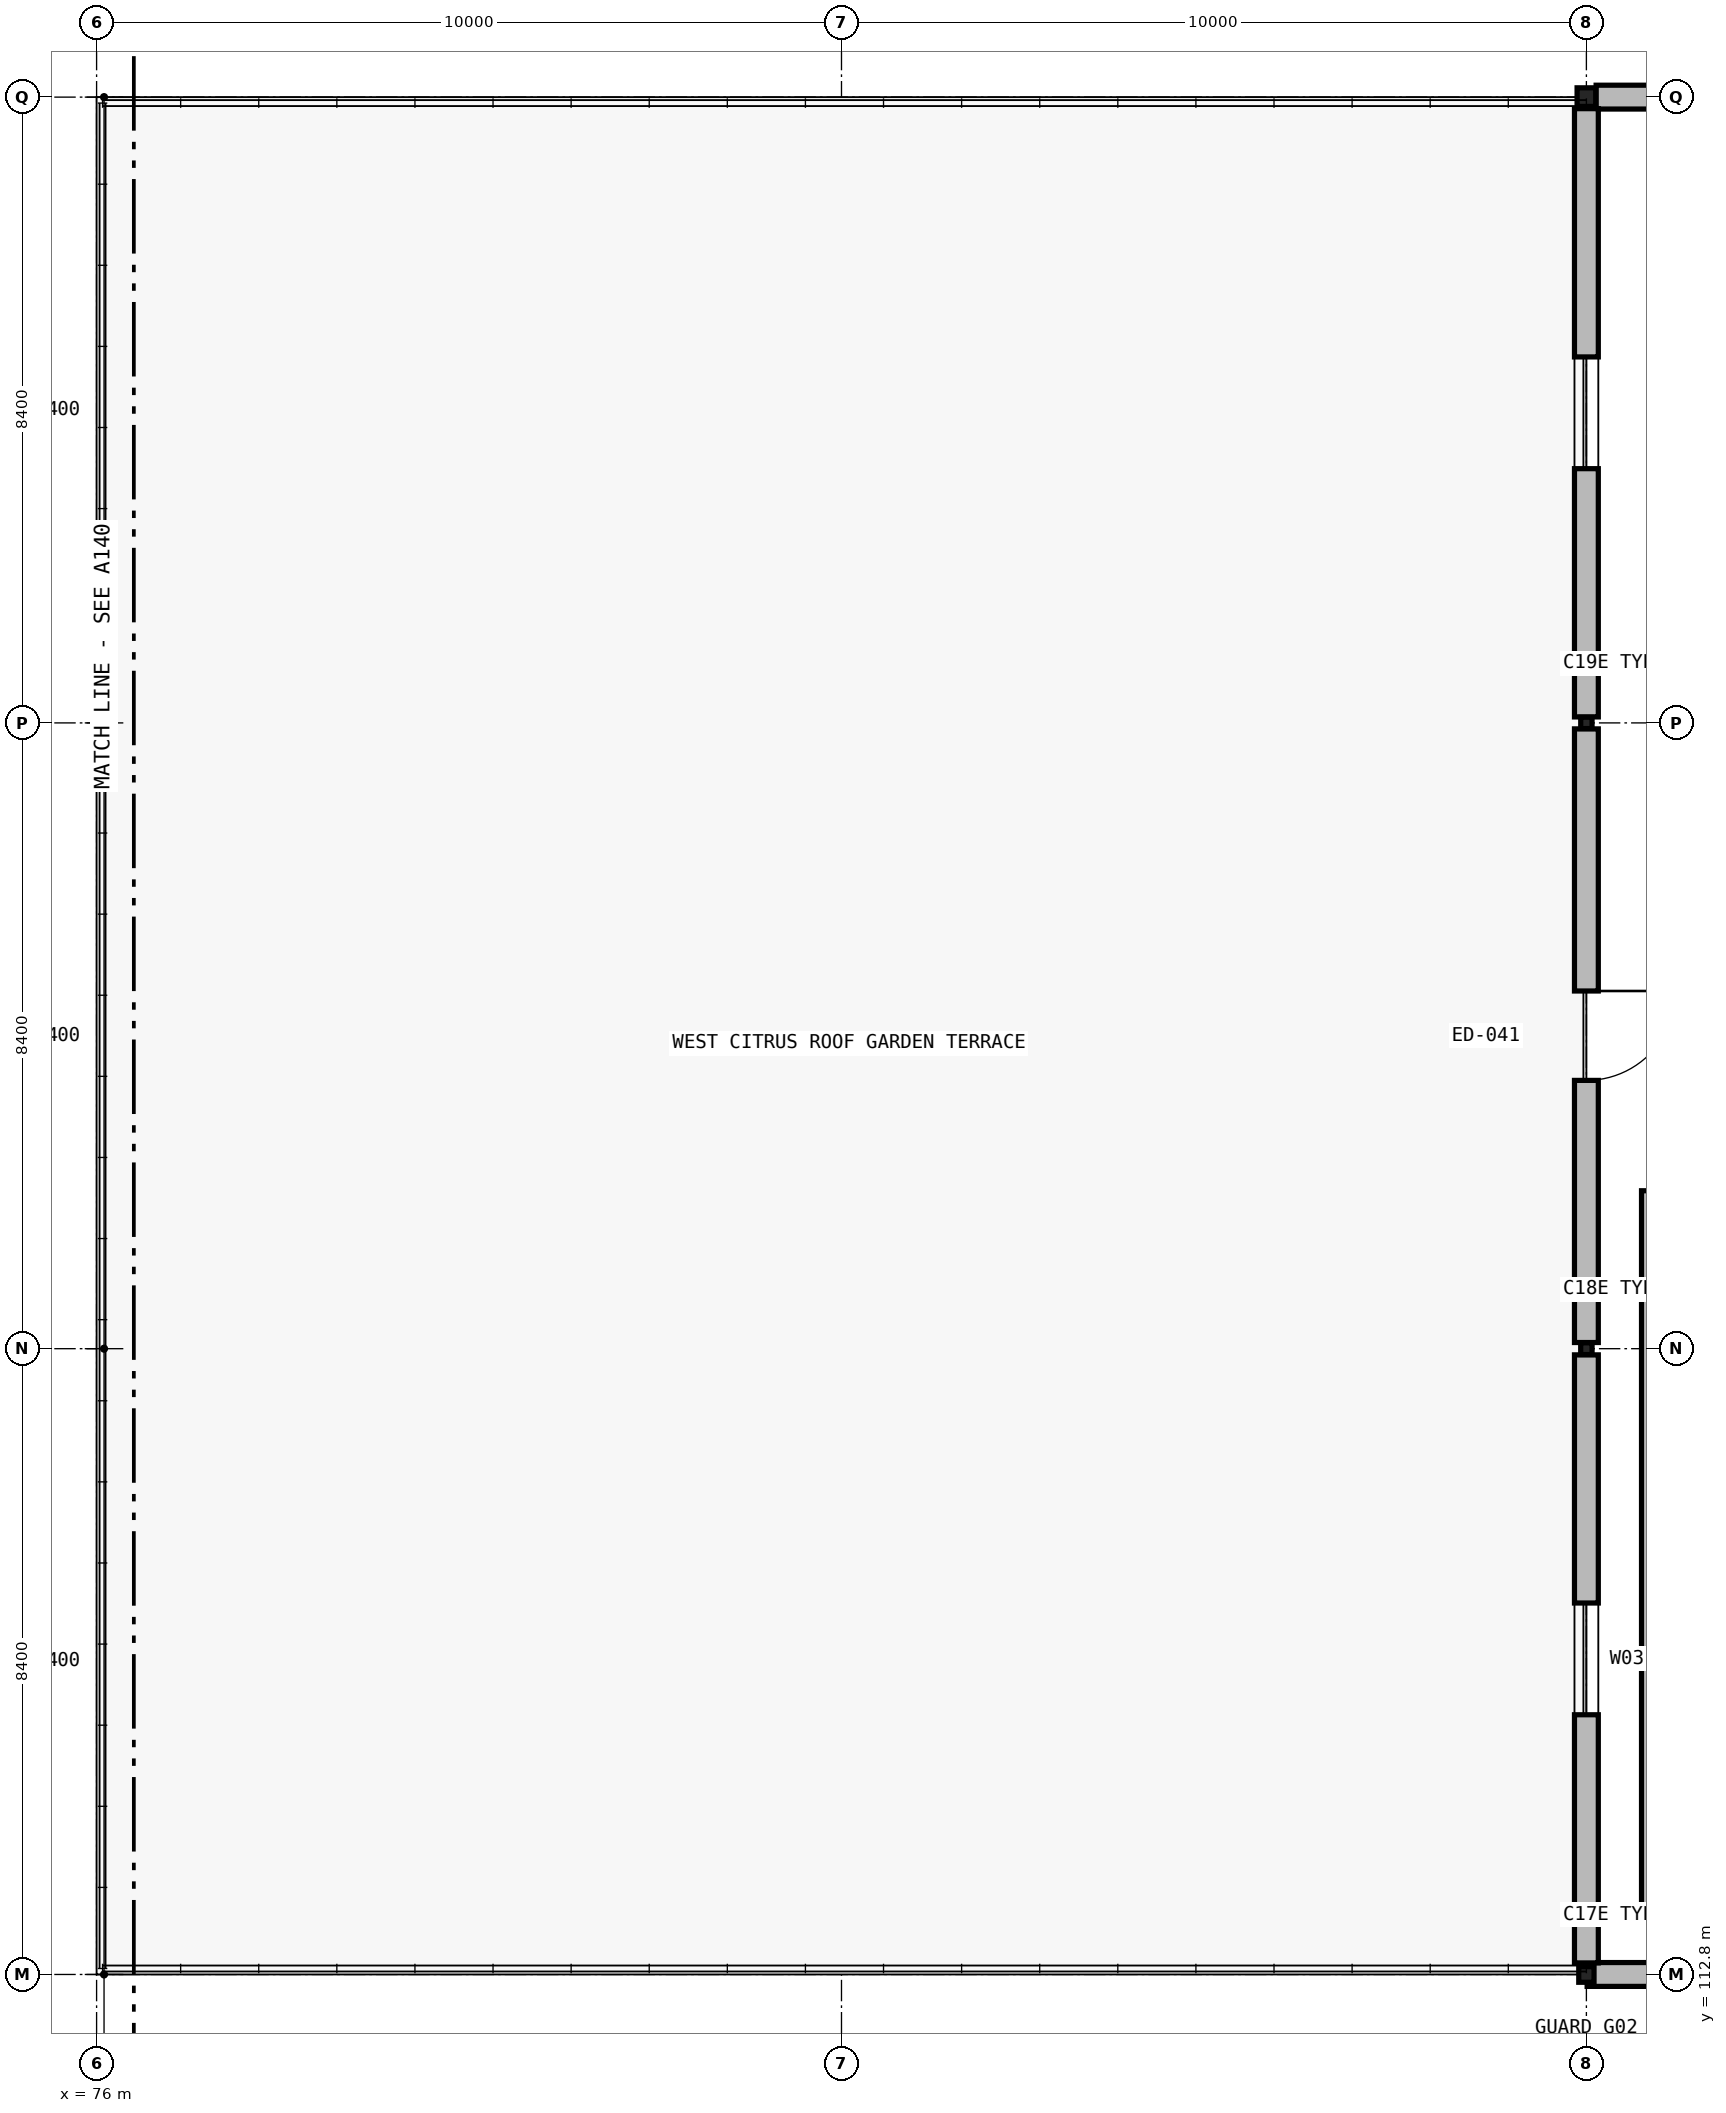
"""IFC4 building model, lengths in metres.
Left out: names, types, materials, properties, quantities, classifications, styles, units other than length and angle.
Written with IfcOpenShell. Run it as: python <this file> out.ifc"""

import sys

from ifc_helpers import new_model, si_unit, direction, frame, frame_2d, origin, origin_2d_with_axis, place, context, subcontext, project, spatial, rectangle, hollow_rectangle, i_section, extrude, element, fill, save


model = new_model("IFC4")
c1 = context("Model", 3, precision=1e-05, world=origin(), true_north=direction((0.0, 1.0)))
c2 = subcontext(c1, "Body", "Model", "MODEL_VIEW")
j1 = project(units=[si_unit("LENGTHUNIT", "METRE"), si_unit("PLANEANGLEUNIT", "RADIAN")], contexts=[c1])
p1 = place(None, origin())
s1 = spatial("IfcSite", under=j1, at=p1, CompositionType="ELEMENT")
p2 = place(p1, origin())
s2 = spatial("IfcBuilding", under=s1, at=p2, CompositionType="ELEMENT")
p3 = place(p2, frame((0.0, 0.0, 15.3)))
s3 = spatial("IfcBuildingStorey", under=s2, at=p3, CompositionType="ELEMENT", Elevation=15.3)
p4 = place(p3, frame((96.0, 112.8, 0.0), z_axis=(0.0, 0.0, 1.0), x_axis=(1.0, 0.0, 0.0)))
e1 = element("IfcColumn", 1, at=p4, inside=s3, PredefinedType="COLUMN", context=c2, shape_type="SweptSolid", body=[
    extrude(i_section(OverallWidth=0.205, OverallDepth=0.21, WebThickness=0.009, FlangeThickness=0.014, FilletRadius=0.011, at=origin_2d_with_axis()), origin(), (0.0, 0.0, 1.0), 3.3),
])
p5 = place(p3, frame((96.0, 121.2, 0.0), z_axis=(0.0, 0.0, 1.0), x_axis=(1.0, 0.0, 0.0)))
e2 = element("IfcColumn", 2, at=p5, inside=s3, PredefinedType="COLUMN", context=c2, shape_type="SweptSolid", body=[
    extrude(i_section(OverallWidth=0.153, OverallDepth=0.158, WebThickness=0.007, FlangeThickness=0.01, FilletRadius=0.009, at=origin_2d_with_axis()), origin(), (0.0, 0.0, 1.0), 3.3),
])
p6 = place(p3, frame((96.0, 129.6, 0.0), z_axis=(0.0, 0.0, 1.0), x_axis=(1.0, 0.0, 0.0)))
e3 = element("IfcColumn", 3, at=p6, inside=s3, PredefinedType="COLUMN", context=c2, shape_type="SweptSolid", body=[
    extrude(i_section(OverallWidth=0.152, OverallDepth=0.152, WebThickness=0.006, FlangeThickness=0.007, FilletRadius=0.009, at=origin_2d_with_axis()), origin(), (0.0, 0.0, 1.0), 3.3),
])
p7 = place(p3, frame((96.0, 138.0, 0.0), z_axis=(0.0, 0.0, 1.0), x_axis=(1.0, 0.0, 0.0)))
e4 = element("IfcColumn", 4, at=p7, inside=s3, PredefinedType="COLUMN", context=c2, shape_type="SweptSolid", body=[
    extrude(hollow_rectangle(XDim=0.25, YDim=0.25, WallThickness=0.009, InnerFilletRadius=0.009, OuterFilletRadius=0.018, at=origin_2d_with_axis()), origin(), (0.0, 0.0, 1.0), 3.3),
])
p8 = place(p3, frame((96.01, 112.8, 0.0), z_axis=(0.0, 0.0, 1.0), x_axis=(1.0, 0.0, 0.0)))
e5 = element("IfcWall", 5, at=p8, inside=s3, PredefinedType="SOLIDWALL", context=c2, shape_type="SweptSolid", body=[
    extrude(rectangle(XDim=9.686, YDim=0.32, at=frame_2d((4.843, 0.0), x_axis=(1.0, 0.0))), origin(), (0.0, 0.0, 1.0), 2.94),
])
p9 = place(p8, frame((1.4, 0.0, 0.85)))
e6 = element("IfcOpeningElement", 6, at=p9, cuts=e5, PredefinedType="OPENING", context=c2, shape_type="SweptSolid", body=[
    extrude(rectangle(XDim=1.8, YDim=1.65, at=frame_2d((0.9, 0.825), x_axis=(1.0, 0.0))), frame((0.0, 0.17, 0.0), z_axis=(0.0, -1.0, 0.0), x_axis=(1.0, 0.0, 0.0)), (0.0, 0.0, 1.0), 0.34),
])
p10 = place(p8, frame((6.486, 0.0, 0.85)))
e7 = element("IfcOpeningElement", 7, at=p10, cuts=e5, PredefinedType="OPENING", context=c2, shape_type="SweptSolid", body=[
    extrude(rectangle(XDim=1.8, YDim=1.65, at=frame_2d((0.9, 0.825), x_axis=(1.0, 0.0))), frame((0.0, 0.17, 0.0), z_axis=(0.0, -1.0, 0.0), x_axis=(1.0, 0.0, 0.0)), (0.0, 0.0, 1.0), 0.34),
])
p11 = place(p3, frame((97.05, 138.0, 0.0), z_axis=(0.0, 0.0, 1.0), x_axis=(-1.0, 0.0, 0.0)))
e8 = element("IfcWall", 8, at=p11, inside=s3, PredefinedType="SOLIDWALL", context=c2, shape_type="SweptSolid", body=[
    extrude(rectangle(XDim=0.919, YDim=0.32, at=frame_2d((0.46, 0.0), x_axis=(1.0, 0.0))), origin(), (0.0, 0.0, 1.0), 2.94),
])
p12 = place(p3, frame((96.0, 121.117, 0.0), z_axis=(0.0, 0.0, 1.0), x_axis=(0.0, -1.0, 0.0)))
e9 = element("IfcWall", 9, at=p12, inside=s3, PredefinedType="SOLIDWALL", context=c2, shape_type="SweptSolid", body=[
    extrude(rectangle(XDim=8.162, YDim=0.32, at=frame_2d((4.081, 0.0), x_axis=(1.0, 0.0))), origin(), (0.0, 0.0, 1.0), 2.94),
])
p13 = place(p12, frame((3.331, 0.0, 0.85)))
e10 = element("IfcOpeningElement", 10, at=p13, cuts=e9, PredefinedType="OPENING", context=c2, shape_type="SweptSolid", body=[
    extrude(rectangle(XDim=1.5, YDim=1.6, at=frame_2d((0.75, 0.8), x_axis=(1.0, 0.0))), frame((0.0, 0.17, 0.0), z_axis=(0.0, -1.0, 0.0), x_axis=(1.0, 0.0, 0.0)), (0.0, 0.0, 1.0), 0.34),
])
p14 = place(p3, frame((96.0, 129.52, 0.0), z_axis=(0.0, 0.0, 1.0), x_axis=(0.0, -1.0, 0.0)))
e11 = element("IfcWall", 11, at=p14, inside=s3, PredefinedType="SOLIDWALL", context=c2, shape_type="SweptSolid", body=[
    extrude(rectangle(XDim=8.237, YDim=0.32, at=frame_2d((4.119, 0.0), x_axis=(1.0, 0.0))), origin(), (0.0, 0.0, 1.0), 2.94),
])
p15 = place(p14, frame((3.519, 0.0, 0.0)))
e12 = element("IfcOpeningElement", 12, at=p15, cuts=e11, PredefinedType="OPENING", context=c2, shape_type="SweptSolid", body=[
    extrude(rectangle(XDim=1.2, YDim=2.2, at=frame_2d((0.6, 1.1), x_axis=(1.0, 0.0))), frame((0.0, 0.17, 0.0), z_axis=(0.0, -1.0, 0.0), x_axis=(1.0, 0.0, 0.0)), (0.0, 0.0, 1.0), 0.34),
])
p16 = place(p3, frame((96.0, 137.845, 0.0), z_axis=(0.0, 0.0, 1.0), x_axis=(0.0, -1.0, 0.0)))
e13 = element("IfcWall", 13, at=p16, inside=s3, PredefinedType="SOLIDWALL", context=c2, shape_type="SweptSolid", body=[
    extrude(rectangle(XDim=8.165, YDim=0.32, at=frame_2d((4.083, 0.0), x_axis=(1.0, 0.0))), origin(), (0.0, 0.0, 1.0), 2.94),
])
p17 = place(p16, frame((3.333, 0.0, 0.85)))
e14 = element("IfcOpeningElement", 14, at=p17, cuts=e13, PredefinedType="OPENING", context=c2, shape_type="SweptSolid", body=[
    extrude(rectangle(XDim=1.5, YDim=1.6, at=frame_2d((0.75, 0.8), x_axis=(1.0, 0.0))), frame((0.0, 0.17, 0.0), z_axis=(0.0, -1.0, 0.0), x_axis=(1.0, 0.0, 0.0)), (0.0, 0.0, 1.0), 0.34),
])
p18 = place(p3, frame((96.8, 123.32, 0.0), z_axis=(0.0, 0.0, 1.0), x_axis=(0.0, -1.0, 0.0)))
e15 = element("IfcWall", 15, at=p18, inside=s3, PredefinedType="PARTITIONING", context=c2, shape_type="SweptSolid", body=[
    extrude(rectangle(XDim=9.64, YDim=0.12, at=frame_2d((4.82, 0.0), x_axis=(1.0, 0.0))), origin(), (0.0, 0.0, 1.0), 2.47),
])
p19 = place(p13, origin())
e16 = element("IfcWindow", 16, at=p19, inside=s3, PartitioningType="SINGLE_PANEL", PredefinedType="WINDOW", context=c2, shape_type="SweptSolid", body=[
    extrude(rectangle(XDim=1.5, YDim=1.6, at=frame_2d((0.75, 0.8), x_axis=(1.0, 0.0))), frame((0.0, 0.03, 0.0), z_axis=(0.0, -1.0, 0.0), x_axis=(1.0, 0.0, 0.0)), (0.0, 0.0, 1.0), 0.06),
])
fill(e10, e16)
p20 = place(p15, origin())
e17 = element("IfcDoor", 17, at=p20, inside=s3, OperationType="SINGLE_SWING_LEFT", PredefinedType="DOOR", context=c2, shape_type="SweptSolid", body=[
    extrude(rectangle(XDim=1.2, YDim=2.2, at=frame_2d((0.6, 1.1), x_axis=(1.0, 0.0))), frame((0.0, 0.025, 0.0), z_axis=(0.0, -1.0, 0.0), x_axis=(1.0, 0.0, 0.0)), (0.0, 0.0, 1.0), 0.05),
])
fill(e12, e17)
p21 = place(p17, origin())
e18 = element("IfcWindow", 18, at=p21, inside=s3, PartitioningType="SINGLE_PANEL", PredefinedType="WINDOW", context=c2, shape_type="SweptSolid", body=[
    extrude(rectangle(XDim=1.5, YDim=1.6, at=frame_2d((0.75, 0.8), x_axis=(1.0, 0.0))), frame((0.0, 0.03, 0.0), z_axis=(0.0, -1.0, 0.0), x_axis=(1.0, 0.0, 0.0)), (0.0, 0.0, 1.0), 0.06),
])
fill(e14, e18)
save(model, sys.argv[1])
